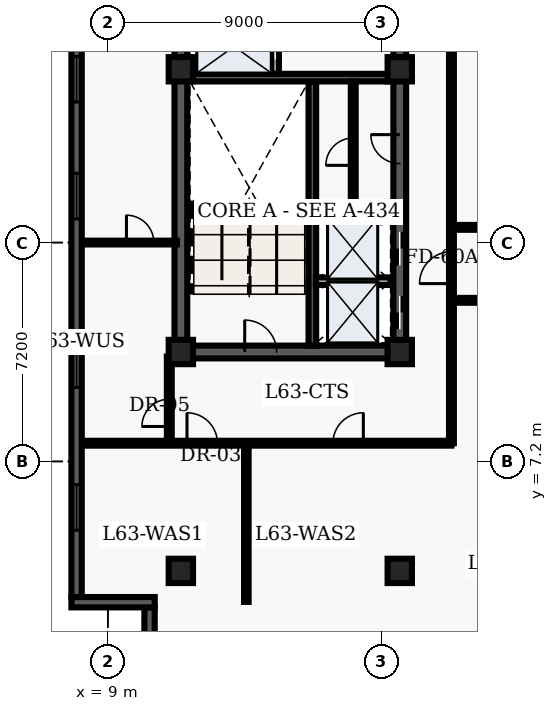
"""IFC4 building model, lengths in metres.
Left out: names, types, materials, properties, quantities, classifications, styles, units other than length and angle.
Written with IfcOpenShell. Run it as: python <this file> out.ifc"""

import sys

from ifc_helpers import new_model, entity, si_unit, converted_unit, direction, frame, origin_with_axes, origin_2d_with_axis, place, context, subcontext, project, spatial, polyline, rectangle, outline, extrude, element, fill, save


model = new_model("IFC4")
c1 = context("Model", 3, precision=1e-05, world=origin_with_axes(), true_north=direction((0.0, 1.0)))
c2 = subcontext(c1, "Body", "Model", "MODEL_VIEW")
j1 = project(units=[si_unit("LENGTHUNIT", "METRE"), converted_unit("PLANEANGLEUNIT", "DEGREE", entity("IfcPlaneAngleMeasure", 0.017), si_unit("PLANEANGLEUNIT", "RADIAN"), dimensions=[0, 0, 0, 0, 0, 0, 0])], contexts=[c1])
p1 = place(None, origin_with_axes())
s1 = spatial("IfcSite", under=j1, at=p1, CompositionType="ELEMENT")
p2 = place(p1, origin_with_axes())
s2 = spatial("IfcBuilding", under=s1, at=p2, CompositionType="ELEMENT")
p3 = place(p2, frame((0.0, 0.0, 256.8), z_axis=(0.0, 0.0, 1.0), x_axis=(1.0, 0.0, 0.0)))
s3 = spatial("IfcBuildingStorey", under=s2, at=p3, CompositionType="ELEMENT", Elevation=256.8)
p4 = place(p3, frame((11.4, 10.8, 0.0), z_axis=(0.0, 0.0, 1.0), x_axis=(0.0, 1.0, 0.0)))
e1 = element("IfcWall", 1, at=p4, inside=s3, PredefinedType="SHEAR", context=c2, shape_type="SweptSolid", body=[
    extrude(outline(polyline([(0.0, -0.21), (27.0, -0.21), (27.0, 0.21), (0.0, 0.21), (0.0, -0.21)])), origin_with_axes(), (0.0, 0.0, 1.0), 3.66),
])
p5 = place(p3, frame((11.4, 10.8, 0.0), z_axis=(0.0, 0.0, 1.0), x_axis=(1.0, 0.0, 0.0)))
e2 = element("IfcWall", 2, at=p5, inside=s3, PredefinedType="SHEAR", context=c2, shape_type="SweptSolid", body=[
    extrude(outline(polyline([(0.0, -0.21), (7.2, -0.21), (7.2, 0.21), (0.0, 0.21), (0.0, -0.21)])), origin_with_axes(), (0.0, 0.0, 1.0), 3.66),
])
p6 = place(p5, frame((2.625, 0.0, 0.0), z_axis=(0.0, 0.0, 1.0), x_axis=(1.0, 0.0, 0.0)))
e3 = element("IfcOpeningElement", 3, at=p6, cuts=e2, PredefinedType="OPENING", context=c2, shape_type="SweptSolid", body=[
    extrude(rectangle(XDim=1.05, YDim=0.44, at=origin_2d_with_axis()), origin_with_axes(), (0.0, 0.0, 1.0), 2.15),
])
p7 = place(p3, frame((18.6, 10.8, 0.0), z_axis=(0.0, 0.0, 1.0), x_axis=(0.0, 1.0, 0.0)))
e4 = element("IfcWall", 4, at=p7, inside=s3, PredefinedType="SHEAR", context=c2, shape_type="SweptSolid", body=[
    extrude(outline(polyline([(0.0, -0.21), (13.5, -0.21), (13.5, 0.21), (0.0, 0.21), (0.0, -0.21)])), origin_with_axes(), (0.0, 0.0, 1.0), 3.66),
])
p8 = place(p7, frame((1.3, 0.0, 0.0), z_axis=(0.0, 0.0, 1.0), x_axis=(1.0, 0.0, 0.0)))
e5 = element("IfcOpeningElement", 5, at=p8, cuts=e4, PredefinedType="OPENING", context=c2, shape_type="SweptSolid", body=[
    extrude(rectangle(XDim=1.1, YDim=0.44, at=origin_2d_with_axis()), origin_with_axes(), (0.0, 0.0, 1.0), 2.15),
])
p9 = place(p7, frame((3.4, 0.0, 0.0), z_axis=(0.0, 0.0, 1.0), x_axis=(1.0, 0.0, 0.0)))
e6 = element("IfcOpeningElement", 6, at=p9, cuts=e4, PredefinedType="OPENING", context=c2, shape_type="SweptSolid", body=[
    extrude(rectangle(XDim=1.1, YDim=0.44, at=origin_2d_with_axis()), origin_with_axes(), (0.0, 0.0, 1.0), 2.15),
])
p10 = place(p7, frame((11.125, 0.0, 0.0), z_axis=(0.0, 0.0, 1.0), x_axis=(1.0, 0.0, 0.0)))
e7 = element("IfcOpeningElement", 7, at=p10, cuts=e4, PredefinedType="OPENING", context=c2, shape_type="SweptSolid", body=[
    extrude(rectangle(XDim=1.05, YDim=0.44, at=origin_2d_with_axis()), origin_with_axes(), (0.0, 0.0, 1.0), 2.15),
])
p11 = place(p7, frame((6.675, 0.0, 0.0), z_axis=(0.0, 0.0, 1.0), x_axis=(1.0, 0.0, 0.0)))
e8 = element("IfcOpeningElement", 8, at=p11, cuts=e4, PredefinedType="OPENING", context=c2, shape_type="SweptSolid", body=[
    extrude(rectangle(XDim=0.95, YDim=0.44, at=origin_2d_with_axis()), origin_with_axes(), (0.0, 0.0, 1.0), 2.15),
])
p12 = place(p3, frame((15.725, 11.01, 0.0), z_axis=(0.0, 0.0, 1.0), x_axis=(0.0, 1.0, 0.0)))
e9 = element("IfcWall", 9, at=p12, inside=s3, PredefinedType="SHEAR", context=c2, shape_type="SweptSolid", body=[
    extrude(outline(polyline([(0.0, -0.125), (8.69, -0.125), (8.69, 0.125), (0.0, 0.125), (0.0, -0.125)])), origin_with_axes(), (0.0, 0.0, 1.0), 3.66),
])
p13 = place(p3, frame((11.61, 19.825, 0.0), z_axis=(0.0, 0.0, 1.0), x_axis=(1.0, 0.0, 0.0)))
e10 = element("IfcWall", 10, at=p13, inside=s3, PredefinedType="SHEAR", context=c2, shape_type="SweptSolid", body=[
    extrude(outline(polyline([(0.0, -0.125), (6.78, -0.125), (6.78, 0.125), (0.0, 0.125), (0.0, -0.125)])), origin_with_axes(), (0.0, 0.0, 1.0), 3.66),
])
p14 = place(p3, frame((14.5, 19.95, 0.0), z_axis=(0.0, 0.0, 1.0), x_axis=(0.0, 1.0, 0.0)))
e11 = element("IfcWall", 11, at=p14, inside=s3, PredefinedType="SOLIDWALL", context=c2, shape_type="SweptSolid", body=[
    extrude(outline(polyline([(0.0, -0.125), (6.25, -0.125), (6.25, 0.125), (0.0, 0.125), (0.0, -0.125)])), origin_with_axes(), (0.0, 0.0, 1.0), 2.7),
])
p15 = place(p14, frame((1.025, 0.0, 0.0), z_axis=(0.0, 0.0, 1.0), x_axis=(1.0, 0.0, 0.0)))
e12 = element("IfcOpeningElement", 12, at=p15, cuts=e11, PredefinedType="OPENING", context=c2, shape_type="SweptSolid", body=[
    extrude(rectangle(XDim=1.1, YDim=0.27, at=origin_2d_with_axis()), origin_with_axes(), (0.0, 0.0, 1.0), 2.15),
])
p16 = place(p14, frame((2.975, 0.0, 0.0), z_axis=(0.0, 0.0, 1.0), x_axis=(1.0, 0.0, 0.0)))
e13 = element("IfcOpeningElement", 13, at=p16, cuts=e11, PredefinedType="OPENING", context=c2, shape_type="SweptSolid", body=[
    extrude(rectangle(XDim=1.1, YDim=0.27, at=origin_2d_with_axis()), origin_with_axes(), (0.0, 0.0, 1.0), 2.15),
])
p17 = place(p14, frame((5.425, 0.0, 0.0), z_axis=(0.0, 0.0, 1.0), x_axis=(1.0, 0.0, 0.0)))
e14 = element("IfcOpeningElement", 14, at=p17, cuts=e11, PredefinedType="OPENING", context=c2, shape_type="SweptSolid", body=[
    extrude(rectangle(XDim=1.2, YDim=0.27, at=origin_2d_with_axis()), origin_with_axes(), (0.0, 0.0, 1.0), 2.15),
])
for number, where, z_axis, x_axis in (
    (15, (11.4, 3.6, 0.0), (0.0, 0.0, 1.0), (1.0, 0.0, 0.0)),
    (16, (11.4, 10.8, 0.0), (0.0, 0.0, 1.0), (1.0, 0.0, 0.0)),
    (17, (11.4, 20.1, 0.0), (0.0, 0.0, 1.0), (1.0, 0.0, 0.0)),
    (18, (18.6, 3.6, 0.0), (0.0, 0.0, 1.0), (1.0, 0.0, 0.0)),
    (19, (18.6, 10.8, 0.0), (0.0, 0.0, 1.0), (1.0, 0.0, 0.0)),
    (20, (18.6, 20.1, 0.0), (0.0, 0.0, 1.0), (1.0, 0.0, 0.0)),
):
    element("IfcColumn", number, at=place(p3, frame(where, z_axis=z_axis, x_axis=x_axis)), inside=s3, PredefinedType="COLUMN", context=c2, shape_type="SweptSolid", body=[
        extrude(rectangle(XDim=0.8, YDim=0.8, at=origin_2d_with_axis()), origin_with_axes(), (0.0, 0.0, 1.0), 3.9),
    ])
for number, where, z_axis, x_axis in (
    (21, (15.84, 13.13, 0.0), (0.0, 0.0, 1.0), (1.0, 0.0, 0.0)),
    (22, (15.84, 15.27, 0.0), (0.0, 0.0, 1.0), (1.0, 0.0, 0.0)),
):
    element("IfcWall", number, at=place(p3, frame(where, z_axis=z_axis, x_axis=x_axis)), inside=s3, PredefinedType="SOLIDWALL", context=c2, shape_type="SweptSolid", body=[
        extrude(outline(polyline([(0.0, -0.125), (2.46, -0.125), (2.46, 0.125), (0.0, 0.125), (0.0, -0.125)])), origin_with_axes(), (0.0, 0.0, 1.0), 2.7),
    ])
p18 = place(p3, frame((17.07, 15.34, 0.0), z_axis=(0.0, 0.0, 1.0), x_axis=(0.0, 1.0, 0.0)))
e23 = element("IfcWall", 23, at=p18, inside=s3, PredefinedType="PARTITIONING", context=c2, shape_type="SweptSolid", body=[
    extrude(outline(polyline([(0.0, -0.08), (4.36, -0.08), (4.36, 0.08), (0.0, 0.08), (0.0, -0.08)])), origin_with_axes(), (0.0, 0.0, 1.0), 2.7),
])
p19 = place(p18, frame((2.05, 0.0, 0.0), z_axis=(0.0, 0.0, 1.0), x_axis=(1.0, 0.0, 0.0)))
e24 = element("IfcOpeningElement", 24, at=p19, cuts=e23, PredefinedType="OPENING", context=c2, shape_type="SweptSolid", body=[
    extrude(rectangle(XDim=0.9, YDim=0.18, at=origin_2d_with_axis()), origin_with_axes(), (0.0, 0.0, 1.0), 2.15),
])
p20 = place(p3, frame((8.135, 7.8, 0.0), z_axis=(0.0, 0.0, 1.0), x_axis=(1.0, 0.0, 0.0)))
e25 = element("IfcWall", 25, at=p20, inside=s3, PredefinedType="PARTITIONING", context=c2, shape_type="SweptSolid", body=[
    extrude(outline(polyline([(0.0, -0.08), (12.165, -0.08), (12.165, 0.08), (0.0, 0.08), (0.0, -0.08)])), origin_with_axes(), (0.0, 0.0, 1.0), 2.7),
])
p21 = place(p20, frame((3.967, 0.0, 0.0), z_axis=(0.0, 0.0, 1.0), x_axis=(1.0, 0.0, 0.0)))
e26 = element("IfcOpeningElement", 26, at=p21, cuts=e25, PredefinedType="OPENING", context=c2, shape_type="SweptSolid", body=[
    extrude(rectangle(XDim=1.0, YDim=0.18, at=origin_2d_with_axis()), origin_with_axes(), (0.0, 0.0, 1.0), 2.15),
])
p22 = place(p20, frame((8.767, 0.0, 0.0), z_axis=(0.0, 0.0, 1.0), x_axis=(1.0, 0.0, 0.0)))
e27 = element("IfcOpeningElement", 27, at=p22, cuts=e25, PredefinedType="OPENING", context=c2, shape_type="SweptSolid", body=[
    extrude(rectangle(XDim=1.0, YDim=0.18, at=origin_2d_with_axis()), origin_with_axes(), (0.0, 0.0, 1.0), 2.15),
])
p23 = place(p3, frame((20.3, 7.8, 0.0), z_axis=(0.0, 0.0, 1.0), x_axis=(0.0, 1.0, 0.0)))
e28 = element("IfcWall", 28, at=p23, inside=s3, PredefinedType="PARTITIONING", context=c2, shape_type="SweptSolid", body=[
    extrude(outline(polyline([(0.0, -0.08), (32.7, -0.08), (32.7, 0.08), (0.0, 0.08), (0.0, -0.08)])), origin_with_axes(), (0.0, 0.0, 1.0), 2.7),
])
p24 = place(p23, frame((17.665, 0.0, 0.0), z_axis=(0.0, 0.0, 1.0), x_axis=(1.0, 0.0, 0.0)))
e29 = element("IfcOpeningElement", 29, at=p24, cuts=e28, PredefinedType="OPENING", context=c2, shape_type="SweptSolid", body=[
    extrude(rectangle(XDim=1.0, YDim=0.18, at=origin_2d_with_axis()), origin_with_axes(), (0.0, 0.0, 1.0), 2.15),
])
p25 = place(p23, frame((27.185, 0.0, 0.0), z_axis=(0.0, 0.0, 1.0), x_axis=(1.0, 0.0, 0.0)))
e30 = element("IfcOpeningElement", 30, at=p25, cuts=e28, PredefinedType="OPENING", context=c2, shape_type="SweptSolid", body=[
    extrude(rectangle(XDim=1.0, YDim=0.18, at=origin_2d_with_axis()), origin_with_axes(), (0.0, 0.0, 1.0), 2.15),
])
p26 = place(p23, frame((5.775, 0.0, 0.0), z_axis=(0.0, 0.0, 1.0), x_axis=(1.0, 0.0, 0.0)))
e31 = element("IfcOpeningElement", 31, at=p26, cuts=e28, PredefinedType="OPENING", context=c2, shape_type="SweptSolid", body=[
    extrude(rectangle(XDim=1.05, YDim=0.18, at=origin_2d_with_axis()), origin_with_axes(), (0.0, 0.0, 1.0), 2.15),
])
p27 = place(p3, frame((11.02, 7.8, 0.0), z_axis=(0.0, 0.0, 1.0), x_axis=(0.0, 1.0, 0.0)))
e32 = element("IfcWall", 32, at=p27, inside=s3, PredefinedType="PARTITIONING", context=c2, shape_type="SweptSolid", body=[
    extrude(outline(polyline([(0.0, -0.08), (2.85, -0.08), (2.85, 0.08), (0.0, 0.08), (0.0, -0.08)])), origin_with_axes(), (0.0, 0.0, 1.0), 2.7),
])
p28 = place(p27, frame((1.0, 0.0, 0.0), z_axis=(0.0, 0.0, 1.0), x_axis=(1.0, 0.0, 0.0)))
e33 = element("IfcOpeningElement", 33, at=p28, cuts=e32, PredefinedType="OPENING", context=c2, shape_type="SweptSolid", body=[
    extrude(rectangle(XDim=0.9, YDim=0.18, at=origin_2d_with_axis()), origin_with_axes(), (0.0, 0.0, 1.0), 2.15),
])
p29 = place(p3, frame((8.135, 14.4, 0.0), z_axis=(0.0, 0.0, 1.0), x_axis=(1.0, 0.0, 0.0)))
e34 = element("IfcWall", 34, at=p29, inside=s3, PredefinedType="PARTITIONING", context=c2, shape_type="SweptSolid", body=[
    extrude(outline(polyline([(0.0, -0.062), (3.135, -0.062), (3.135, 0.062), (0.0, 0.062), (0.0, -0.062)])), origin_with_axes(), (0.0, 0.0, 1.0), 2.7),
])
p30 = place(p29, frame((1.925, 0.0, 0.0), z_axis=(0.0, 0.0, 1.0), x_axis=(1.0, 0.0, 0.0)))
e35 = element("IfcOpeningElement", 35, at=p30, cuts=e34, PredefinedType="OPENING", context=c2, shape_type="SweptSolid", body=[
    extrude(rectangle(XDim=0.9, YDim=0.145, at=origin_2d_with_axis()), origin_with_axes(), (0.0, 0.0, 1.0), 2.15),
])
p31 = place(p3, frame((13.554, 2.58, 0.0), z_axis=(0.0, 0.0, 1.0), x_axis=(0.0, 1.0, 0.0)))
e36 = element("IfcWall", 36, at=p31, inside=s3, PredefinedType="PARTITIONING", context=c2, shape_type="SweptSolid", body=[
    extrude(outline(polyline([(0.0, -0.075), (5.12, -0.075), (5.12, 0.075), (0.0, 0.075), (0.0, -0.075)])), origin_with_axes(), (0.0, 0.0, 1.0), 2.7),
])
p32 = place(p3, frame((20.3, 12.5, 0.0), z_axis=(0.0, 0.0, 1.0), x_axis=(1.0, 0.0, 0.0)))
e37 = element("IfcWall", 37, at=p32, inside=s3, PredefinedType="PARTITIONING", context=c2, shape_type="SweptSolid", body=[
    extrude(outline(polyline([(0.0, -0.08), (16.05, -0.08), (16.05, 0.08), (0.0, 0.08), (0.0, -0.08)])), origin_with_axes(), (0.0, 0.0, 1.0), 2.7),
])
p33 = place(p32, frame((3.645, 0.0, 0.0), z_axis=(0.0, 0.0, 1.0), x_axis=(1.0, 0.0, 0.0)))
e38 = element("IfcOpeningElement", 38, at=p33, cuts=e37, PredefinedType="OPENING", context=c2, shape_type="SweptSolid", body=[
    extrude(rectangle(XDim=1.0, YDim=0.18, at=origin_2d_with_axis()), origin_with_axes(), (0.0, 0.0, 1.0), 2.15),
])
p34 = place(p32, frame((11.54, 0.0, 0.0), z_axis=(0.0, 0.0, 1.0), x_axis=(1.0, 0.0, 0.0)))
e39 = element("IfcOpeningElement", 39, at=p34, cuts=e37, PredefinedType="OPENING", context=c2, shape_type="SweptSolid", body=[
    extrude(rectangle(XDim=1.0, YDim=0.18, at=origin_2d_with_axis()), origin_with_axes(), (0.0, 0.0, 1.0), 2.15),
])
p35 = place(p3, frame((20.3, 14.9, 0.0), z_axis=(0.0, 0.0, 1.0), x_axis=(1.0, 0.0, 0.0)))
e40 = element("IfcWall", 40, at=p35, inside=s3, PredefinedType="PARTITIONING", context=c2, shape_type="SweptSolid", body=[
    extrude(outline(polyline([(0.0, -0.08), (16.05, -0.08), (16.05, 0.08), (0.0, 0.08), (0.0, -0.08)])), origin_with_axes(), (0.0, 0.0, 1.0), 2.7),
])
p36 = place(p35, frame((5.582, 0.0, 0.0), z_axis=(0.0, 0.0, 1.0), x_axis=(1.0, 0.0, 0.0)))
e41 = element("IfcOpeningElement", 41, at=p36, cuts=e40, PredefinedType="OPENING", context=c2, shape_type="SweptSolid", body=[
    extrude(rectangle(XDim=1.2, YDim=0.18, at=origin_2d_with_axis()), origin_with_axes(), (0.0, 0.0, 1.0), 2.2),
])
p37 = place(p35, frame((13.477, 0.0, 0.0), z_axis=(0.0, 0.0, 1.0), x_axis=(1.0, 0.0, 0.0)))
e42 = element("IfcOpeningElement", 42, at=p37, cuts=e40, PredefinedType="OPENING", context=c2, shape_type="SweptSolid", body=[
    extrude(rectangle(XDim=1.0, YDim=0.18, at=origin_2d_with_axis()), origin_with_axes(), (0.0, 0.0, 1.0), 2.15),
])
p38 = place(p3, frame((10.37, 0.34, 0.0), z_axis=(0.0, 0.0, 1.0), x_axis=(0.0, 1.0, 0.0)))
e43 = element("IfcWall", 43, at=p38, inside=s3, PredefinedType="SOLIDWALL", context=c2, shape_type="SweptSolid", body=[
    extrude(outline(polyline([(0.0, -0.17), (2.06, -0.17), (2.06, 0.17), (0.0, 0.17), (0.0, -0.17)])), origin_with_axes(), (0.0, 0.0, 1.0), 3.66),
])
p39 = place(p3, frame((10.54, 2.57, 0.0), z_axis=(0.0, 0.0, 1.0), x_axis=(-1.0, 0.0, 0.0)))
e44 = element("IfcWall", 44, at=p39, inside=s3, PredefinedType="SOLIDWALL", context=c2, shape_type="SweptSolid", body=[
    extrude(outline(polyline([(0.0, -0.17), (2.74, -0.17), (2.74, 0.17), (0.0, 0.17), (0.0, -0.17)])), origin_with_axes(), (0.0, 0.0, 1.0), 3.66),
])
p40 = place(p3, frame((7.97, 2.74, 0.0), z_axis=(0.0, 0.0, 1.0), x_axis=(0.0, 1.0, 0.0)))
e45 = element("IfcWall", 45, at=p40, inside=s3, PredefinedType="SOLIDWALL", context=c2, shape_type="SweptSolid", body=[
    extrude(outline(polyline([(0.0, -0.17), (43.46, -0.17), (43.46, 0.17), (0.0, 0.17), (0.0, -0.17)])), origin_with_axes(), (0.0, 0.0, 1.0), 3.66),
])
p41 = place(p40, frame((2.948, 0.0, 0.45), z_axis=(0.0, 0.0, 1.0), x_axis=(1.0, 0.0, 0.0)))
e46 = element("IfcOpeningElement", 46, at=p41, cuts=e45, PredefinedType="OPENING", context=c2, shape_type="SweptSolid", body=[
    extrude(rectangle(XDim=1.5, YDim=0.36, at=origin_2d_with_axis()), origin_with_axes(), (0.0, 0.0, 1.0), 2.1),
])
p42 = place(p40, frame((7.643, 0.0, 0.45), z_axis=(0.0, 0.0, 1.0), x_axis=(1.0, 0.0, 0.0)))
e47 = element("IfcOpeningElement", 47, at=p42, cuts=e45, PredefinedType="OPENING", context=c2, shape_type="SweptSolid", body=[
    extrude(rectangle(XDim=1.5, YDim=0.36, at=origin_2d_with_axis()), origin_with_axes(), (0.0, 0.0, 1.0), 2.1),
])
p43 = place(p40, frame((13.189, 0.0, 0.45), z_axis=(0.0, 0.0, 1.0), x_axis=(1.0, 0.0, 0.0)))
e48 = element("IfcOpeningElement", 48, at=p43, cuts=e45, PredefinedType="OPENING", context=c2, shape_type="SweptSolid", body=[
    extrude(rectangle(XDim=1.5, YDim=0.36, at=origin_2d_with_axis()), origin_with_axes(), (0.0, 0.0, 1.0), 2.1),
])
p44 = place(p40, frame((17.034, 0.0, 0.45), z_axis=(0.0, 0.0, 1.0), x_axis=(1.0, 0.0, 0.0)))
e49 = element("IfcOpeningElement", 49, at=p44, cuts=e45, PredefinedType="OPENING", context=c2, shape_type="SweptSolid", body=[
    extrude(rectangle(XDim=1.5, YDim=0.36, at=origin_2d_with_axis()), origin_with_axes(), (0.0, 0.0, 1.0), 2.1),
])
p45 = place(p40, frame((21.73, 0.0, 0.45), z_axis=(0.0, 0.0, 1.0), x_axis=(1.0, 0.0, 0.0)))
e50 = element("IfcOpeningElement", 50, at=p45, cuts=e45, PredefinedType="OPENING", context=c2, shape_type="SweptSolid", body=[
    extrude(rectangle(XDim=1.5, YDim=0.36, at=origin_2d_with_axis()), origin_with_axes(), (0.0, 0.0, 1.0), 2.1),
])
p46 = place(p40, frame((26.426, 0.0, 0.45), z_axis=(0.0, 0.0, 1.0), x_axis=(1.0, 0.0, 0.0)))
e51 = element("IfcOpeningElement", 51, at=p46, cuts=e45, PredefinedType="OPENING", context=c2, shape_type="SweptSolid", body=[
    extrude(rectangle(XDim=1.5, YDim=0.36, at=origin_2d_with_axis()), origin_with_axes(), (0.0, 0.0, 1.0), 2.1),
])
p47 = place(p40, frame((35.817, 0.0, 0.45), z_axis=(0.0, 0.0, 1.0), x_axis=(1.0, 0.0, 0.0)))
e52 = element("IfcOpeningElement", 52, at=p47, cuts=e45, PredefinedType="OPENING", context=c2, shape_type="SweptSolid", body=[
    extrude(rectangle(XDim=1.5, YDim=0.36, at=origin_2d_with_axis()), origin_with_axes(), (0.0, 0.0, 1.0), 2.1),
])
p48 = place(p40, frame((40.512, 0.0, 0.45), z_axis=(0.0, 0.0, 1.0), x_axis=(1.0, 0.0, 0.0)))
e53 = element("IfcOpeningElement", 53, at=p48, cuts=e45, PredefinedType="OPENING", context=c2, shape_type="SweptSolid", body=[
    extrude(rectangle(XDim=1.5, YDim=0.36, at=origin_2d_with_axis()), origin_with_axes(), (0.0, 0.0, 1.0), 2.1),
])
p49 = place(p7, frame((1.3, 0.0, 0.0), z_axis=(0.0, 0.0, 1.0), x_axis=(1.0, 0.0, 0.0)))
e54 = element("IfcDoor", 54, at=p49, inside=s3, OperationType="SLIDING_TO_LEFT", PredefinedType="DOOR", context=c2, shape_type="SweptSolid", body=[
    extrude(rectangle(XDim=1.1, YDim=0.09, at=origin_2d_with_axis()), origin_with_axes(), (0.0, 0.0, 1.0), 2.15),
])
fill(e5, e54)
p50 = place(p7, frame((3.4, 0.0, 0.0), z_axis=(0.0, 0.0, 1.0), x_axis=(1.0, 0.0, 0.0)))
e55 = element("IfcDoor", 55, at=p50, inside=s3, OperationType="SLIDING_TO_RIGHT", PredefinedType="DOOR", context=c2, shape_type="SweptSolid", body=[
    extrude(rectangle(XDim=1.1, YDim=0.09, at=origin_2d_with_axis()), origin_with_axes(), (0.0, 0.0, 1.0), 2.15),
])
fill(e6, e55)
p51 = place(p14, frame((1.025, 0.0, 0.0), z_axis=(0.0, 0.0, 1.0), x_axis=(1.0, 0.0, 0.0)))
e56 = element("IfcDoor", 56, at=p51, inside=s3, OperationType="SLIDING_TO_LEFT", PredefinedType="DOOR", context=c2, shape_type="SweptSolid", body=[
    extrude(rectangle(XDim=1.1, YDim=0.09, at=origin_2d_with_axis()), origin_with_axes(), (0.0, 0.0, 1.0), 2.15),
])
fill(e12, e56)
p52 = place(p5, frame((2.625, 0.0, 0.0), z_axis=(0.0, 0.0, 1.0), x_axis=(1.0, 0.0, 0.0)))
e57 = element("IfcDoor", 57, at=p52, inside=s3, OperationType="SINGLE_SWING_LEFT", PredefinedType="DOOR", context=c2, shape_type="SweptSolid", body=[
    extrude(rectangle(XDim=1.05, YDim=0.09, at=origin_2d_with_axis()), origin_with_axes(), (0.0, 0.0, 1.0), 2.15),
])
fill(e3, e57)
p53 = place(p18, frame((2.05, 0.0, 0.0), z_axis=(0.0, 0.0, 1.0), x_axis=(1.0, 0.0, 0.0)))
e58 = element("IfcDoor", 58, at=p53, inside=s3, OperationType="SINGLE_SWING_LEFT", PredefinedType="DOOR", context=c2, shape_type="SweptSolid", body=[
    extrude(rectangle(XDim=0.9, YDim=0.09, at=origin_2d_with_axis()), origin_with_axes(), (0.0, 0.0, 1.0), 2.15),
])
fill(e24, e58)
p54 = place(p7, frame((6.675, 0.0, 0.0), z_axis=(0.0, 0.0, 1.0), x_axis=(1.0, 0.0, 0.0)))
e59 = element("IfcDoor", 59, at=p54, inside=s3, OperationType="SINGLE_SWING_RIGHT", PredefinedType="DOOR", context=c2, shape_type="SweptSolid", body=[
    extrude(rectangle(XDim=0.95, YDim=0.09, at=origin_2d_with_axis()), origin_with_axes(), (0.0, 0.0, 1.0), 2.15),
])
fill(e8, e59)
p55 = place(p27, frame((1.0, 0.0, 0.0), z_axis=(0.0, 0.0, 1.0), x_axis=(1.0, 0.0, 0.0)))
e60 = element("IfcDoor", 60, at=p55, inside=s3, OperationType="SINGLE_SWING_LEFT", PredefinedType="DOOR", context=c2, shape_type="SweptSolid", body=[
    extrude(rectangle(XDim=0.9, YDim=0.09, at=origin_2d_with_axis()), origin_with_axes(), (0.0, 0.0, 1.0), 2.15),
])
fill(e33, e60)
p56 = place(p29, frame((1.925, 0.0, 0.0), z_axis=(0.0, 0.0, 1.0), x_axis=(1.0, 0.0, 0.0)))
e61 = element("IfcDoor", 61, at=p56, inside=s3, OperationType="SINGLE_SWING_LEFT", PredefinedType="DOOR", context=c2, shape_type="SweptSolid", body=[
    extrude(rectangle(XDim=0.9, YDim=0.075, at=origin_2d_with_axis()), origin_with_axes(), (0.0, 0.0, 1.0), 2.15),
])
fill(e35, e61)
p57 = place(p20, frame((3.967, 0.0, 0.0), z_axis=(0.0, 0.0, 1.0), x_axis=(1.0, 0.0, 0.0)))
e62 = element("IfcDoor", 62, at=p57, inside=s3, OperationType="SINGLE_SWING_LEFT", PredefinedType="DOOR", context=c2, shape_type="SweptSolid", body=[
    extrude(rectangle(XDim=1.0, YDim=0.09, at=origin_2d_with_axis()), origin_with_axes(), (0.0, 0.0, 1.0), 2.15),
])
fill(e26, e62)
p58 = place(p20, frame((8.767, 0.0, 0.0), z_axis=(0.0, 0.0, 1.0), x_axis=(1.0, 0.0, 0.0)))
e63 = element("IfcDoor", 63, at=p58, inside=s3, OperationType="SINGLE_SWING_RIGHT", PredefinedType="DOOR", context=c2, shape_type="SweptSolid", body=[
    extrude(rectangle(XDim=1.0, YDim=0.09, at=origin_2d_with_axis()), origin_with_axes(), (0.0, 0.0, 1.0), 2.15),
])
fill(e27, e63)
p59 = place(p23, frame((5.775, 0.0, 0.0), z_axis=(0.0, 0.0, 1.0), x_axis=(1.0, 0.0, 0.0)))
e64 = element("IfcDoor", 64, at=p59, inside=s3, OperationType="SINGLE_SWING_LEFT", PredefinedType="DOOR", context=c2, shape_type="SweptSolid", body=[
    extrude(rectangle(XDim=1.05, YDim=0.09, at=origin_2d_with_axis()), origin_with_axes(), (0.0, 0.0, 1.0), 2.15),
])
fill(e31, e64)
p60 = place(p40, frame((2.948, 0.0, 0.45), z_axis=(0.0, 0.0, 1.0), x_axis=(1.0, 0.0, 0.0)))
e65 = element("IfcWindow", 65, at=p60, inside=s3, PredefinedType="WINDOW", context=c2, shape_type="SweptSolid", body=[
    extrude(rectangle(XDim=1.5, YDim=0.09, at=origin_2d_with_axis()), origin_with_axes(), (0.0, 0.0, 1.0), 2.1),
])
fill(e46, e65)
p61 = place(p40, frame((7.643, 0.0, 0.45), z_axis=(0.0, 0.0, 1.0), x_axis=(1.0, 0.0, 0.0)))
e66 = element("IfcWindow", 66, at=p61, inside=s3, PredefinedType="WINDOW", context=c2, shape_type="SweptSolid", body=[
    extrude(rectangle(XDim=1.5, YDim=0.09, at=origin_2d_with_axis()), origin_with_axes(), (0.0, 0.0, 1.0), 2.1),
])
fill(e47, e66)
p62 = place(p40, frame((13.189, 0.0, 0.45), z_axis=(0.0, 0.0, 1.0), x_axis=(1.0, 0.0, 0.0)))
e67 = element("IfcWindow", 67, at=p62, inside=s3, PredefinedType="WINDOW", context=c2, shape_type="SweptSolid", body=[
    extrude(rectangle(XDim=1.5, YDim=0.09, at=origin_2d_with_axis()), origin_with_axes(), (0.0, 0.0, 1.0), 2.1),
])
fill(e48, e67)
p63 = place(p40, frame((17.034, 0.0, 0.45), z_axis=(0.0, 0.0, 1.0), x_axis=(1.0, 0.0, 0.0)))
e68 = element("IfcWindow", 68, at=p63, inside=s3, PredefinedType="WINDOW", context=c2, shape_type="SweptSolid", body=[
    extrude(rectangle(XDim=1.5, YDim=0.09, at=origin_2d_with_axis()), origin_with_axes(), (0.0, 0.0, 1.0), 2.1),
])
fill(e49, e68)
save(model, sys.argv[1])
